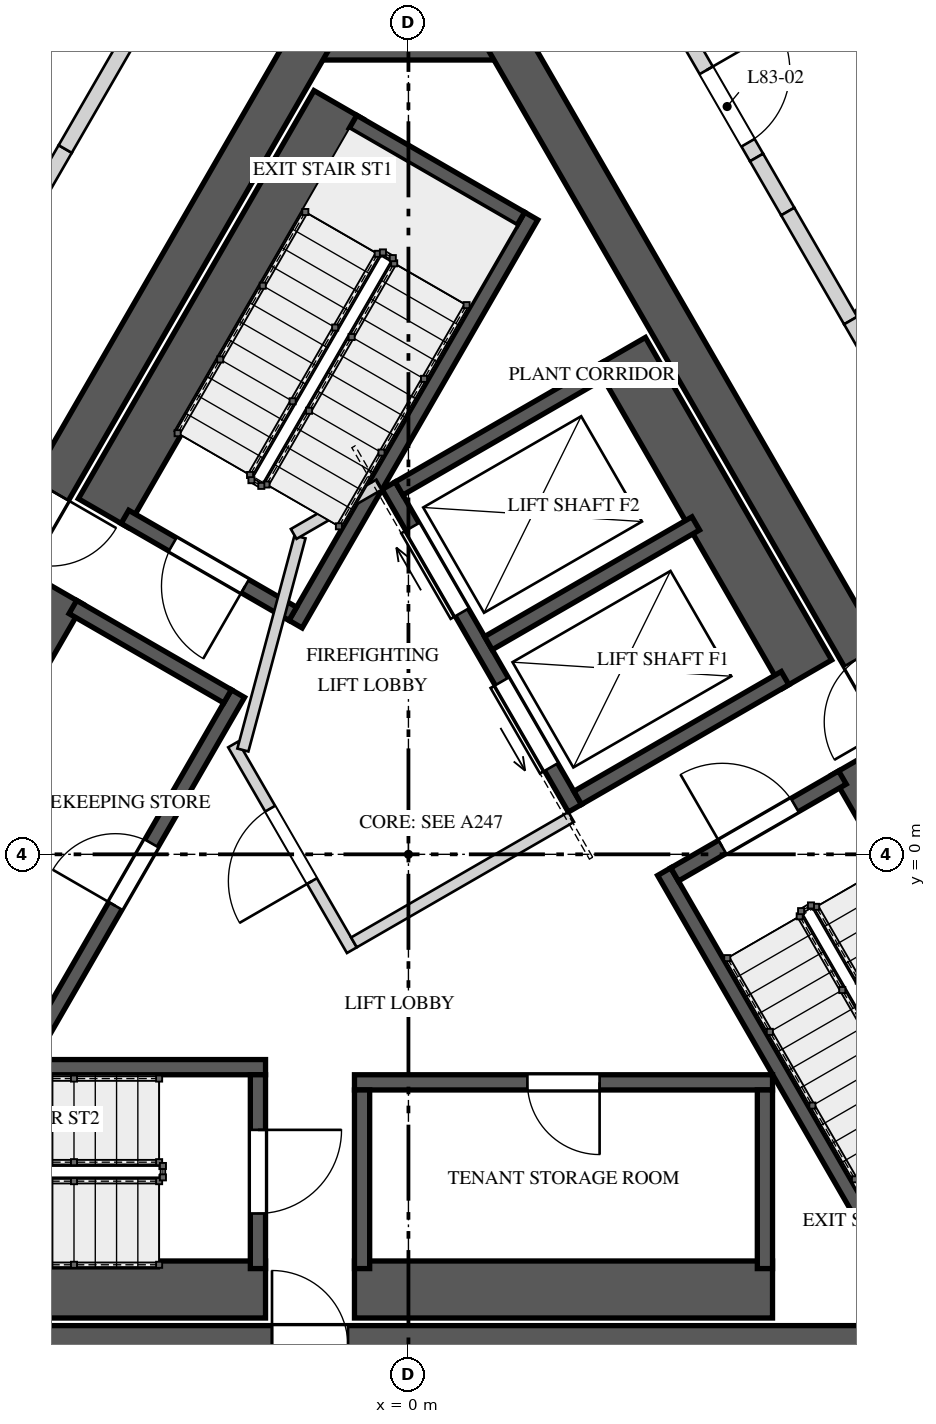
"""IFC4 building model, lengths in metres.
Left out: names, types, materials, properties, quantities, classifications, styles, units other than length and angle.
Written with IfcOpenShell. Run it as: python <this file> out.ifc"""

import sys

from ifc_helpers import new_model, si_unit, direction, frame, frame_2d, origin, place, context, subcontext, project, spatial, rectangle, extrude, element, fill, save


model = new_model("IFC4")
c1 = context("Model", 3, precision=1e-05, world=origin(), true_north=direction((0.0, 1.0)))
c2 = subcontext(c1, "Body", "Model", "MODEL_VIEW")
j1 = project(units=[si_unit("LENGTHUNIT", "METRE"), si_unit("PLANEANGLEUNIT", "RADIAN")], contexts=[c1])
p1 = place(None, origin())
s1 = spatial("IfcSite", under=j1, at=p1, CompositionType="ELEMENT")
p2 = place(p1, origin())
s2 = spatial("IfcBuilding", under=s1, at=p2, CompositionType="ELEMENT")
p3 = place(p2, frame((0.0, 0.0, 361.4)))
s3 = spatial("IfcBuildingStorey", under=s2, at=p3, CompositionType="ELEMENT", Elevation=361.4)
p4 = place(p3, frame((1.443, 10.725, 0.0), z_axis=(0.0, 0.0, 1.0), x_axis=(-1.0, 0.0, 0.0)))
e1 = element("IfcWall", 1, at=p4, inside=s3, PredefinedType="SHEAR", context=c2, shape_type="SweptSolid", body=[
    extrude(rectangle(XDim=2.887, YDim=0.55, at=frame_2d((1.443, 0.0))), origin(), (0.0, 0.0, 1.0), 4.5),
])
p5 = place(p3, frame((-1.285, 10.725, 0.0), z_axis=(0.0, 0.0, 1.0), x_axis=(-0.499994590896, -0.86602852671, 0.0)))
e2 = element("IfcWall", 2, at=p5, inside=s3, PredefinedType="SHEAR", context=c2, shape_type="SweptSolid", body=[
    extrude(rectangle(XDim=17.292, YDim=0.55, at=frame_2d((8.646, 0.0))), origin(), (0.0, 0.0, 1.0), 4.5),
])
p6 = place(p5, frame((6.851, 0.0, 0.0)))
e3 = element("IfcOpeningElement", 3, at=p6, cuts=e2, PredefinedType="OPENING", context=c2, shape_type="SweptSolid", body=[
    extrude(rectangle(XDim=1.0, YDim=2.4, at=frame_2d((0.5, 1.2))), frame((0.0, 0.285, 0.0), z_axis=(0.0, -1.0, 0.0), x_axis=(1.0, 0.0, 0.0)), (0.0, 0.0, 1.0), 0.57),
])
p7 = place(p5, frame((15.089, 0.0, 0.0)))
e4 = element("IfcOpeningElement", 4, at=p7, cuts=e2, PredefinedType="OPENING", context=c2, shape_type="SweptSolid", body=[
    extrude(rectangle(XDim=0.8, YDim=2.1, at=frame_2d((0.4, 1.05))), frame((0.0, 0.285, 0.0), z_axis=(0.0, -1.0, 0.0), x_axis=(1.0, 0.0, 0.0)), (0.0, 0.0, 1.0), 0.57),
])
p8 = place(p3, frame((-8.646, -6.475, 0.0), z_axis=(0.0, 0.0, 1.0), x_axis=(1.0, 0.0, 0.0)))
e5 = element("IfcWall", 5, at=p8, inside=s3, PredefinedType="SHEAR", context=c2, shape_type="SweptSolid", body=[
    extrude(rectangle(XDim=17.292, YDim=0.55, at=frame_2d((8.646, 0.0))), origin(), (0.0, 0.0, 1.0), 4.5),
])
p9 = place(p8, frame((6.851, 0.0, 0.0)))
e6 = element("IfcOpeningElement", 6, at=p9, cuts=e5, PredefinedType="OPENING", context=c2, shape_type="SweptSolid", body=[
    extrude(rectangle(XDim=1.0, YDim=2.4, at=frame_2d((0.5, 1.2))), frame((0.0, 0.285, 0.0), z_axis=(0.0, -1.0, 0.0), x_axis=(1.0, 0.0, 0.0)), (0.0, 0.0, 1.0), 0.57),
])
p10 = place(p3, frame((9.93, -4.25, 0.0), z_axis=(0.0, 0.0, 1.0), x_axis=(-0.499994590896, 0.86602852671, 0.0)))
e7 = element("IfcWall", 7, at=p10, inside=s3, PredefinedType="SHEAR", context=c2, shape_type="SweptSolid", body=[
    extrude(rectangle(XDim=17.292, YDim=0.55, at=frame_2d((8.646, 0.0))), origin(), (0.0, 0.0, 1.0), 4.5),
])
p11 = place(p10, frame((6.921, 0.0, 0.0)))
e8 = element("IfcOpeningElement", 8, at=p11, cuts=e7, PredefinedType="OPENING", context=c2, shape_type="SweptSolid", body=[
    extrude(rectangle(XDim=1.0, YDim=2.4, at=frame_2d((0.5, 1.2))), frame((0.0, 0.285, 0.0), z_axis=(0.0, -1.0, 0.0), x_axis=(1.0, 0.0, 0.0)), (0.0, 0.0, 1.0), 0.57),
])
p12 = place(p3, frame((-0.918, 9.86, 0.0), z_axis=(0.0, 0.0, 1.0), x_axis=(-0.500026960575, -0.86600983753, 0.0)))
e9 = element("IfcWall", 9, at=p12, inside=s3, PredefinedType="SOLIDWALL", context=c2, shape_type="SweptSolid", body=[
    extrude(rectangle(XDim=6.2, YDim=0.75, at=frame_2d((3.1, 0.0))), origin(), (0.0, 0.0, 1.0), 4.15),
])
p13 = place(p3, frame((1.615, 8.397, 0.0), z_axis=(0.0, 0.0, 1.0), x_axis=(-0.500009909098, -0.866019682689, 0.0)))
e10 = element("IfcWall", 10, at=p13, inside=s3, PredefinedType="SOLIDWALL", context=c2, shape_type="SweptSolid", body=[
    extrude(rectangle(XDim=6.2, YDim=0.2, at=frame_2d((3.1, 0.0))), origin(), (0.0, 0.0, 1.0), 4.15),
])
p14 = place(p3, frame((1.479, 8.361, 0.0), z_axis=(0.0, 0.0, 1.0), x_axis=(-0.865989465428, 0.500062241894, 0.0)))
e11 = element("IfcWall", 11, at=p14, inside=s3, PredefinedType="SOLIDWALL", context=c2, shape_type="SweptSolid", body=[
    extrude(rectangle(XDim=2.55, YDim=0.2, at=frame_2d((1.275, 0.0))), origin(), (0.0, 0.0, 1.0), 4.15),
])
p15 = place(p3, frame((-1.521, 3.165, 0.0), z_axis=(0.0, 0.0, 1.0), x_axis=(-0.866030925526, 0.499990435942, 0.0)))
e12 = element("IfcWall", 12, at=p15, inside=s3, PredefinedType="SOLIDWALL", context=c2, shape_type="SweptSolid", body=[
    extrude(rectangle(XDim=2.55, YDim=0.2, at=frame_2d((1.275, 0.0))), origin(), (0.0, 0.0, 1.0), 4.15),
])
p16 = place(p15, frame((0.725, 0.0, 0.0)))
e13 = element("IfcOpeningElement", 13, at=p16, cuts=e12, PredefinedType="OPENING", context=c2, shape_type="SweptSolid", body=[
    extrude(rectangle(XDim=1.1, YDim=2.4, at=frame_2d((0.55, 1.2))), frame((0.0, 0.11, 0.0), z_axis=(0.0, -1.0, 0.0), x_axis=(1.0, 0.0, 0.0)), (0.0, 0.0, 1.0), 0.22),
])
p17 = place(p3, frame((-8.08, -5.725, 0.0), z_axis=(0.0, 0.0, 1.0), x_axis=(1.0, 0.0, 0.0)))
e14 = element("IfcWall", 14, at=p17, inside=s3, PredefinedType="SOLIDWALL", context=c2, shape_type="SweptSolid", body=[
    extrude(rectangle(XDim=6.2, YDim=0.75, at=frame_2d((3.1, 0.0))), origin(), (0.0, 0.0, 1.0), 4.15),
])
p18 = place(p3, frame((-8.08, -2.8, 0.0), z_axis=(0.0, 0.0, 1.0), x_axis=(1.0, 0.0, 0.0)))
e15 = element("IfcWall", 15, at=p18, inside=s3, PredefinedType="SOLIDWALL", context=c2, shape_type="SweptSolid", body=[
    extrude(rectangle(XDim=6.2, YDim=0.2, at=frame_2d((3.1, 0.0))), origin(), (0.0, 0.0, 1.0), 4.15),
])
p19 = place(p3, frame((-1.98, -2.9, 0.0), z_axis=(0.0, 0.0, 1.0), x_axis=(0.0, -1.0, 0.0)))
e16 = element("IfcWall", 16, at=p19, inside=s3, PredefinedType="SOLIDWALL", context=c2, shape_type="SweptSolid", body=[
    extrude(rectangle(XDim=2.55, YDim=0.2, at=frame_2d((1.275, 0.0))), origin(), (0.0, 0.0, 1.0), 4.15),
])
p20 = place(p19, frame((0.725, 0.0, 0.0)))
e17 = element("IfcOpeningElement", 17, at=p20, cuts=e16, PredefinedType="OPENING", context=c2, shape_type="SweptSolid", body=[
    extrude(rectangle(XDim=1.1, YDim=2.4, at=frame_2d((0.55, 1.2))), frame((0.0, 0.11, 0.0), z_axis=(0.0, -1.0, 0.0), x_axis=(1.0, 0.0, 0.0)), (0.0, 0.0, 1.0), 0.22),
])
p21 = place(p3, frame((8.998, -4.135, 0.0), z_axis=(0.0, 0.0, 1.0), x_axis=(-0.500009909098, 0.866019682689, 0.0)))
e18 = element("IfcWall", 18, at=p21, inside=s3, PredefinedType="SOLIDWALL", context=c2, shape_type="SweptSolid", body=[
    extrude(rectangle(XDim=6.2, YDim=0.75, at=frame_2d((3.1, 0.0))), origin(), (0.0, 0.0, 1.0), 4.15),
])
p22 = place(p3, frame((6.465, -5.597, 0.0), z_axis=(0.0, 0.0, 1.0), x_axis=(-0.49998037582, 0.866036733513, 0.0)))
e19 = element("IfcWall", 19, at=p22, inside=s3, PredefinedType="SOLIDWALL", context=c2, shape_type="SweptSolid", body=[
    extrude(rectangle(XDim=6.2, YDim=0.2, at=frame_2d((3.1, 0.0))), origin(), (0.0, 0.0, 1.0), 4.15),
])
p23 = place(p3, frame((3.501, -0.265, 0.0), z_axis=(0.0, 0.0, 1.0), x_axis=(0.866030925526, 0.499990435942, 0.0)))
e20 = element("IfcWall", 20, at=p23, inside=s3, PredefinedType="SOLIDWALL", context=c2, shape_type="SweptSolid", body=[
    extrude(rectangle(XDim=2.55, YDim=0.2, at=frame_2d((1.275, 0.0))), origin(), (0.0, 0.0, 1.0), 4.15),
])
p24 = place(p23, frame((0.725, 0.0, 0.0)))
e21 = element("IfcOpeningElement", 21, at=p24, cuts=e20, PredefinedType="OPENING", context=c2, shape_type="SweptSolid", body=[
    extrude(rectangle(XDim=1.1, YDim=2.4, at=frame_2d((0.55, 1.2))), frame((0.0, 0.11, 0.0), z_axis=(0.0, -1.0, 0.0), x_axis=(1.0, 0.0, 0.0)), (0.0, 0.0, 1.0), 0.22),
])
p25 = place(p3, frame((-4.993, -2.648, 0.0), z_axis=(0.0, 0.0, 1.0), x_axis=(0.499996545922, 0.866027397988, 0.0)))
e22 = element("IfcWall", 22, at=p25, inside=s3, PredefinedType="SOLIDWALL", context=c2, shape_type="SweptSolid", body=[
    extrude(rectangle(XDim=5.5, YDim=0.2, at=frame_2d((2.75, 0.0))), origin(), (0.0, 0.0, 1.0), 4.15),
])
p26 = place(p25, frame((2.275, 0.0, 0.0)))
e23 = element("IfcOpeningElement", 23, at=p26, cuts=e22, PredefinedType="OPENING", context=c2, shape_type="SweptSolid", body=[
    extrude(rectangle(XDim=0.95, YDim=2.4, at=frame_2d((0.475, 1.2))), frame((0.0, 0.11, 0.0), z_axis=(0.0, -1.0, 0.0), x_axis=(1.0, 0.0, 0.0)), (0.0, 0.0, 1.0), 0.22),
])
p27 = place(p3, frame((-4.603, 3.477, 0.0), z_axis=(0.0, 0.0, 1.0), x_axis=(-0.500015767406, -0.866016300277, 0.0)))
e24 = element("IfcWall", 24, at=p27, inside=s3, PredefinedType="SOLIDWALL", context=c2, shape_type="SweptSolid", body=[
    extrude(rectangle(XDim=5.5, YDim=0.75, at=frame_2d((2.75, 0.0))), origin(), (0.0, 0.0, 1.0), 4.15),
])
p28 = place(p3, frame((-2.38, 2.078, 0.0), z_axis=(0.0, 0.0, 1.0), x_axis=(-0.866061024631, 0.499938297808, 0.0)))
e25 = element("IfcWall", 25, at=p28, inside=s3, PredefinedType="SOLIDWALL", context=c2, shape_type="SweptSolid", body=[
    extrude(rectangle(XDim=2.35, YDim=0.2, at=frame_2d((1.175, 0.0))), origin(), (0.0, 0.0, 1.0), 4.15),
])
p29 = place(p3, frame((4.79, -3.0, 0.0), z_axis=(0.0, 0.0, 1.0), x_axis=(-1.0, 0.0, 0.0)))
e26 = element("IfcWall", 26, at=p29, inside=s3, PredefinedType="SOLIDWALL", context=c2, shape_type="SweptSolid", body=[
    extrude(rectangle(XDim=5.5, YDim=0.2, at=frame_2d((2.75, 0.0))), origin(), (0.0, 0.0, 1.0), 4.15),
])
p30 = place(p29, frame((2.275, 0.0, 0.0)))
e27 = element("IfcOpeningElement", 27, at=p30, cuts=e26, PredefinedType="OPENING", context=c2, shape_type="SweptSolid", body=[
    extrude(rectangle(XDim=0.95, YDim=2.4, at=frame_2d((0.475, 1.2))), frame((0.0, 0.11, 0.0), z_axis=(0.0, -1.0, 0.0), x_axis=(1.0, 0.0, 0.0)), (0.0, 0.0, 1.0), 0.22),
])
p31 = place(p3, frame((-0.71, -5.725, 0.0), z_axis=(0.0, 0.0, 1.0), x_axis=(1.0, 0.0, 0.0)))
e28 = element("IfcWall", 28, at=p31, inside=s3, PredefinedType="SOLIDWALL", context=c2, shape_type="SweptSolid", body=[
    extrude(rectangle(XDim=5.5, YDim=0.75, at=frame_2d((2.75, 0.0))), origin(), (0.0, 0.0, 1.0), 4.15),
])
for number, where, z_axis, x_axis in (
    (29, (-0.61, -3.1, 0.0), (0.0, 0.0, 1.0), (0.0, -1.0, 0.0)),
    (30, (4.69, -3.1, 0.0), (0.0, 0.0, 1.0), (0.0, -1.0, 0.0)),
):
    element("IfcWall", number, at=place(p3, frame(where, z_axis=z_axis, x_axis=x_axis)), inside=s3, PredefinedType="SOLIDWALL", context=c2, shape_type="SweptSolid", body=[
        extrude(rectangle(XDim=2.35, YDim=0.2, at=frame_2d((1.175, 0.0))), origin(), (0.0, 0.0, 1.0), 4.15),
    ])
p32 = place(p3, frame((2.19, 0.606, 0.0), z_axis=(0.0, 0.0, 1.0), x_axis=(-0.500002801628, 0.866023786258, 0.0)))
e31 = element("IfcWall", 31, at=p32, inside=s3, PredefinedType="SOLIDWALL", context=c2, shape_type="SweptSolid", body=[
    extrude(rectangle(XDim=4.9, YDim=0.2, at=frame_2d((2.45, 0.0))), origin(), (0.0, 0.0, 1.0), 4.15),
])
p33 = place(p32, frame((0.625, 0.0, 0.0)))
e32 = element("IfcOpeningElement", 32, at=p33, cuts=e31, PredefinedType="OPENING", context=c2, shape_type="SweptSolid", body=[
    extrude(rectangle(XDim=1.3, YDim=2.1, at=frame_2d((0.65, 1.05))), frame((0.0, 0.11, 0.0), z_axis=(0.0, -1.0, 0.0), x_axis=(1.0, 0.0, 0.0)), (0.0, 0.0, 1.0), 0.22),
])
p34 = place(p32, frame((2.975, 0.0, 0.0)))
e33 = element("IfcOpeningElement", 33, at=p34, cuts=e31, PredefinedType="OPENING", context=c2, shape_type="SweptSolid", body=[
    extrude(rectangle(XDim=1.3, YDim=2.1, at=frame_2d((0.65, 1.05))), frame((0.0, 0.11, 0.0), z_axis=(0.0, -1.0, 0.0), x_axis=(1.0, 0.0, 0.0)), (0.0, 0.0, 1.0), 0.22),
])
p35 = place(p3, frame((5.243, 2.369, 0.0), z_axis=(0.0, 0.0, 1.0), x_axis=(-0.500002801628, 0.866023786258, 0.0)))
e34 = element("IfcWall", 34, at=p35, inside=s3, PredefinedType="SOLIDWALL", context=c2, shape_type="SweptSolid", body=[
    extrude(rectangle(XDim=4.9, YDim=0.75, at=frame_2d((2.45, 0.0))), origin(), (0.0, 0.0, 1.0), 4.15),
])
for number, where, z_axis, x_axis in (
    (35, (2.227, 0.743, 0.0), (0.0, 0.0, 1.0), (0.866, 0.5, 0.0)),
    (36, (1.052, 2.778, 0.0), (0.0, 0.0, 1.0), (0.866, 0.5, 0.0)),
    (37, (-0.123, 4.813, 0.0), (0.0, 0.0, 1.0), (0.866, 0.5, 0.0)),
):
    element("IfcWall", number, at=place(p3, frame(where, z_axis=z_axis, x_axis=x_axis)), inside=s3, PredefinedType="SOLIDWALL", context=c2, shape_type="SweptSolid", body=[
        extrude(rectangle(XDim=3.15, YDim=0.2, at=frame_2d((1.575, 0.0))), origin(), (0.0, 0.0, 1.0), 4.15),
    ])
p36 = place(p3, frame((-0.744, -1.261, 0.0), z_axis=(0.0, 0.0, 1.0), x_axis=(-0.500004234368, 0.866022959057, 0.0)))
e38 = element("IfcWall", 38, at=p36, inside=s3, PredefinedType="PARTITIONING", context=c2, shape_type="SweptSolid", body=[
    extrude(rectangle(XDim=3.125, YDim=0.15, at=frame_2d((1.562, 0.0))), origin(), (0.0, 0.0, 1.0), 4.15),
])
p37 = place(p36, frame((1.05, 0.0, 0.0)))
e39 = element("IfcOpeningElement", 39, at=p37, cuts=e38, PredefinedType="OPENING", context=c2, shape_type="SweptSolid", body=[
    extrude(rectangle(XDim=1.1, YDim=2.4, at=frame_2d((0.55, 1.2))), frame((0.0, 0.085, 0.0), z_axis=(0.0, -1.0, 0.0), x_axis=(1.0, 0.0, 0.0)), (0.0, 0.0, 1.0), 0.17),
])
p38 = place(p3, frame((-0.717, -1.159, 0.0), z_axis=(0.0, 0.0, 1.0), x_axis=(0.866008176907, 0.50002983664, 0.0)))
e40 = element("IfcWall", 40, at=p38, inside=s3, PredefinedType="PARTITIONING", context=c2, shape_type="SweptSolid", body=[
    extrude(rectangle(XDim=3.3, YDim=0.15, at=frame_2d((1.65, 0.0))), origin(), (0.0, 0.0, 1.0), 4.15),
])
p39 = place(p3, frame((-2.178, 1.372, 0.0), z_axis=(0.0, 0.0, 1.0), x_axis=(0.258808958833, 0.96592852884, 0.0)))
e41 = element("IfcWall", 41, at=p39, inside=s3, PredefinedType="PARTITIONING", context=c2, shape_type="SweptSolid", body=[
    extrude(rectangle(XDim=2.903, YDim=0.15, at=frame_2d((1.451, 0.0))), origin(), (0.0, 0.0, 1.0), 4.15),
])
p40 = place(p3, frame((-1.51, 4.215, 0.0), z_axis=(0.0, 0.0, 1.0), x_axis=(0.866085525409, 0.49989585183, 0.0)))
e42 = element("IfcWall", 42, at=p40, inside=s3, PredefinedType="PARTITIONING", context=c2, shape_type="SweptSolid", body=[
    extrude(rectangle(XDim=1.3, YDim=0.15, at=frame_2d((0.65, 0.0))), origin(), (0.0, 0.0, 1.0), 4.15),
])
p41 = place(p3, frame((5.909, 7.066, 0.0), z_axis=(0.0, 0.0, 1.0), x_axis=(0.641462458468, 0.767154426681, 0.0)))
e43 = element("IfcWall", 43, at=p41, inside=s3, PredefinedType="PARTITIONING", context=c2, shape_type="SweptSolid", body=[
    extrude(rectangle(XDim=0.563, YDim=0.15, at=frame_2d((0.282, 0.0))), origin(), (0.0, 0.0, 1.0), 3.05),
])
p42 = place(p3, frame((-4.929, 8.563, 0.0), z_axis=(0.0, 0.0, 1.0), x_axis=(0.500046299512, 0.865998671098, 0.0)))
e44 = element("IfcWall", 44, at=p42, inside=s3, PredefinedType="SOLIDWALL", context=c2, shape_type="SweptSolid", body=[
    extrude(rectangle(XDim=0.827, YDim=0.2, at=frame_2d((0.413, 0.0))), origin(), (0.0, 0.0, 1.0), 3.45),
])
p43 = place(p3, frame((-4.515, 9.279, 0.0), z_axis=(0.0, 0.0, 1.0), x_axis=(0.499975428181, 0.866039589866, 0.0)))
e45 = element("IfcWall", 45, at=p43, inside=s3, PredefinedType="SOLIDWALL", context=c2, shape_type="SweptSolid", body=[
    extrude(rectangle(XDim=4.066, YDim=0.2, at=frame_2d((2.033, 0.0))), origin(), (0.0, 0.0, 1.0), 4.15),
])
p44 = place(p3, frame((2.483, 12.8, 0.0), z_axis=(0.0, 0.0, 1.0), x_axis=(0.499982771656, -0.866035350345, 0.0)))
e46 = element("IfcWall", 46, at=p44, inside=s3, PredefinedType="SOLIDWALL", context=c2, shape_type="SweptSolid", body=[
    extrude(rectangle(XDim=4.195, YDim=0.2, at=frame_2d((2.097, 0.0))), origin(), (0.0, 0.0, 1.0), 4.15),
])
p45 = place(p44, frame((2.87, 0.0, 0.0)))
e47 = element("IfcOpeningElement", 47, at=p45, cuts=e46, PredefinedType="OPENING", context=c2, shape_type="SweptSolid", body=[
    extrude(rectangle(XDim=1.1, YDim=2.4, at=frame_2d((0.55, 1.2))), frame((0.0, 0.11, 0.0), z_axis=(0.0, -1.0, 0.0), x_axis=(1.0, 0.0, 0.0)), (0.0, 0.0, 1.0), 0.22),
])
p46 = place(p3, frame((4.58, 9.167, 0.0), z_axis=(0.0, 0.0, 1.0), x_axis=(0.499945576647, -0.866056822842, 0.0)))
e48 = element("IfcWall", 48, at=p46, inside=s3, PredefinedType="SOLIDWALL", context=c2, shape_type="SweptSolid", body=[
    extrude(rectangle(XDim=0.821, YDim=0.2, at=frame_2d((0.41, 0.0))), origin(), (0.0, 0.0, 1.0), 3.45),
])
p47 = place(p3, frame((4.99, 8.457, 0.0), z_axis=(0.0, 0.0, 1.0), x_axis=(0.500024536802, -0.866011236992, 0.0)))
e49 = element("IfcWall", 49, at=p47, inside=s3, PredefinedType="SOLIDWALL", context=c2, shape_type="SweptSolid", body=[
    extrude(rectangle(XDim=1.656, YDim=0.2, at=frame_2d((0.828, 0.0))), origin(), (0.0, 0.0, 1.0), 4.15),
])
p48 = place(p3, frame((5.818, 7.023, 0.0), z_axis=(0.0, 0.0, 1.0), x_axis=(0.500006071987, -0.866021898093, 0.0)))
e50 = element("IfcWall", 50, at=p48, inside=s3, PredefinedType="SOLIDWALL", context=c2, shape_type="SweptSolid", body=[
    extrude(rectangle(XDim=0.944, YDim=0.2, at=frame_2d((0.472, 0.0))), origin(), (0.0, 0.0, 1.0), 3.05),
])
p49 = place(p16, origin())
e51 = element("IfcDoor", 51, at=p49, inside=s3, OperationType="SINGLE_SWING_RIGHT", PredefinedType="DOOR", context=c2, shape_type="SweptSolid", body=[
    extrude(rectangle(XDim=1.1, YDim=2.4, at=frame_2d((0.55, 1.2))), frame((0.0, 0.025, 0.0), z_axis=(0.0, -1.0, 0.0), x_axis=(1.0, 0.0, 0.0)), (0.0, 0.0, 1.0), 0.05),
])
fill(e13, e51)
p50 = place(p20, origin())
e52 = element("IfcDoor", 52, at=p50, inside=s3, OperationType="SINGLE_SWING_LEFT", PredefinedType="DOOR", context=c2, shape_type="SweptSolid", body=[
    extrude(rectangle(XDim=1.1, YDim=2.4, at=frame_2d((0.55, 1.2))), frame((0.0, 0.025, 0.0), z_axis=(0.0, -1.0, 0.0), x_axis=(1.0, 0.0, 0.0)), (0.0, 0.0, 1.0), 0.05),
])
fill(e17, e52)
p51 = place(p24, origin())
e53 = element("IfcDoor", 53, at=p51, inside=s3, OperationType="SINGLE_SWING_RIGHT", PredefinedType="DOOR", context=c2, shape_type="SweptSolid", body=[
    extrude(rectangle(XDim=1.1, YDim=2.4, at=frame_2d((0.55, 1.2))), frame((0.0, 0.025, 0.0), z_axis=(0.0, -1.0, 0.0), x_axis=(1.0, 0.0, 0.0)), (0.0, 0.0, 1.0), 0.05),
])
fill(e21, e53)
p52 = place(p26, origin())
e54 = element("IfcDoor", 54, at=p52, inside=s3, OperationType="SINGLE_SWING_LEFT", PredefinedType="DOOR", context=c2, shape_type="SweptSolid", body=[
    extrude(rectangle(XDim=0.95, YDim=2.4, at=frame_2d((0.475, 1.2))), frame((0.0, 0.025, 0.0), z_axis=(0.0, -1.0, 0.0), x_axis=(1.0, 0.0, 0.0)), (0.0, 0.0, 1.0), 0.05),
])
fill(e23, e54)
p53 = place(p30, origin())
e55 = element("IfcDoor", 55, at=p53, inside=s3, OperationType="SINGLE_SWING_RIGHT", PredefinedType="DOOR", context=c2, shape_type="SweptSolid", body=[
    extrude(rectangle(XDim=0.95, YDim=2.4, at=frame_2d((0.475, 1.2))), frame((0.0, 0.025, 0.0), z_axis=(0.0, -1.0, 0.0), x_axis=(1.0, 0.0, 0.0)), (0.0, 0.0, 1.0), 0.05),
])
fill(e27, e55)
p54 = place(p33, origin())
e56 = element("IfcDoor", 56, at=p54, inside=s3, OperationType="SLIDING_TO_LEFT", PredefinedType="DOOR", context=c2, shape_type="SweptSolid", body=[
    extrude(rectangle(XDim=1.3, YDim=2.1, at=frame_2d((0.65, 1.05))), frame((0.0, 0.025, 0.0), z_axis=(0.0, -1.0, 0.0), x_axis=(1.0, 0.0, 0.0)), (0.0, 0.0, 1.0), 0.05),
])
fill(e32, e56)
p55 = place(p34, origin())
e57 = element("IfcDoor", 57, at=p55, inside=s3, OperationType="SLIDING_TO_RIGHT", PredefinedType="DOOR", context=c2, shape_type="SweptSolid", body=[
    extrude(rectangle(XDim=1.3, YDim=2.1, at=frame_2d((0.65, 1.05))), frame((0.0, 0.025, 0.0), z_axis=(0.0, -1.0, 0.0), x_axis=(1.0, 0.0, 0.0)), (0.0, 0.0, 1.0), 0.05),
])
fill(e33, e57)
p56 = place(p37, origin())
e58 = element("IfcDoor", 58, at=p56, inside=s3, OperationType="SINGLE_SWING_LEFT", PredefinedType="DOOR", context=c2, shape_type="SweptSolid", body=[
    extrude(rectangle(XDim=1.1, YDim=2.4, at=frame_2d((0.55, 1.2))), frame((0.0, 0.025, 0.0), z_axis=(0.0, -1.0, 0.0), x_axis=(1.0, 0.0, 0.0)), (0.0, 0.0, 1.0), 0.05),
])
fill(e39, e58)
p57 = place(p45, origin())
e59 = element("IfcDoor", 59, at=p57, inside=s3, OperationType="SINGLE_SWING_LEFT", PredefinedType="DOOR", context=c2, shape_type="SweptSolid", body=[
    extrude(rectangle(XDim=1.1, YDim=2.4, at=frame_2d((0.55, 1.2))), frame((0.0, 0.025, 0.0), z_axis=(0.0, -1.0, 0.0), x_axis=(1.0, 0.0, 0.0)), (0.0, 0.0, 1.0), 0.05),
])
fill(e47, e59)
save(model, sys.argv[1])
